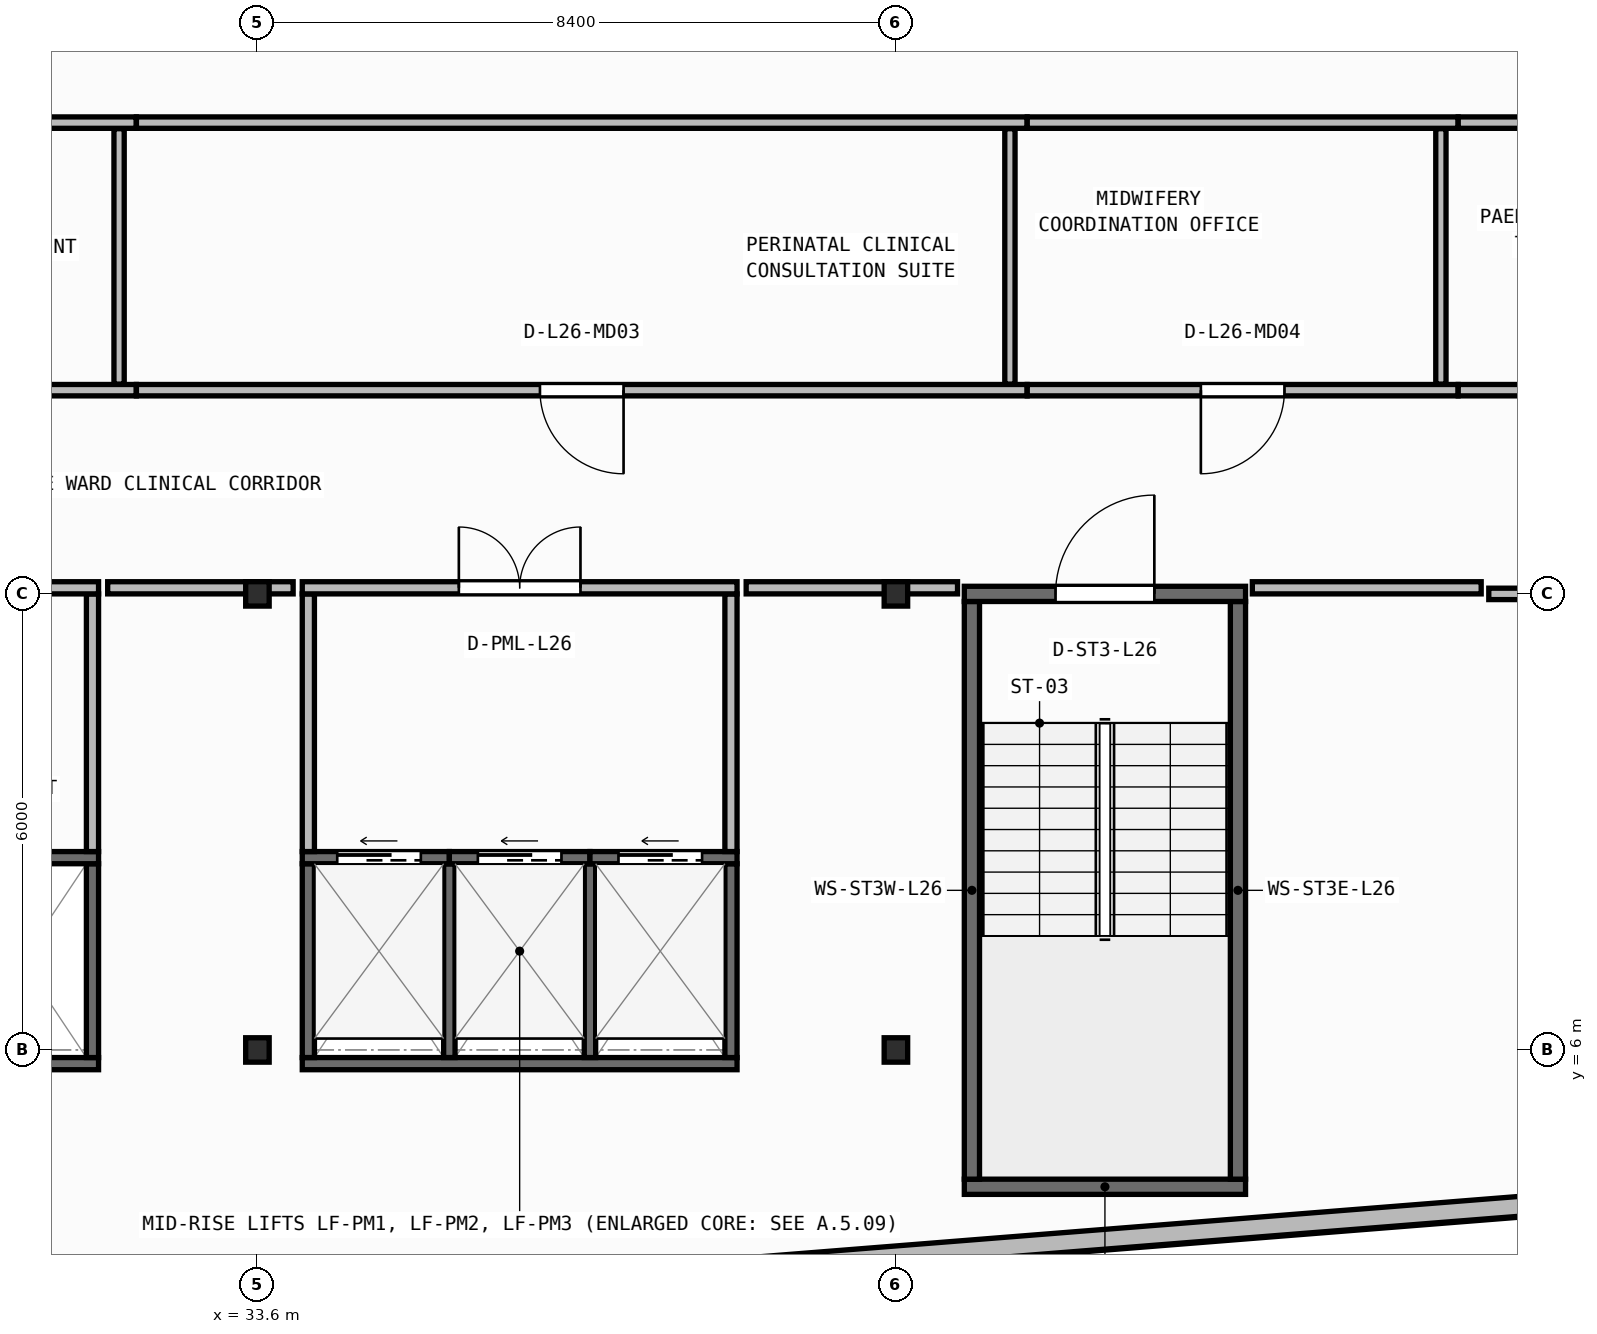
"""IFC4 building model, lengths in metres.
Left out: names, types, materials, properties, quantities, classifications, styles, units other than length and angle.
Written with IfcOpenShell. Run it as: python <this file> out.ifc"""

import sys

from ifc_helpers import new_model, si_unit, direction, frame, frame_2d, origin, origin_2d, place, context, subcontext, project, spatial, rectangle, i_section, extrude, element, fill, save


model = new_model("IFC4")
c1 = context("Model", 3, precision=1e-05, world=origin(), true_north=direction((0.0, 1.0)))
c2 = subcontext(c1, "Body", "Model", "MODEL_VIEW")
j1 = project(units=[si_unit("LENGTHUNIT", "METRE"), si_unit("PLANEANGLEUNIT", "RADIAN")], contexts=[c1])
p1 = place(None, origin())
s1 = spatial("IfcSite", under=j1, at=p1, CompositionType="ELEMENT")
p2 = place(p1, origin())
s2 = spatial("IfcBuilding", under=s1, at=p2, CompositionType="ELEMENT")
p3 = place(p2, frame((0.0, 0.0, 107.3)))
s3 = spatial("IfcBuildingStorey", under=s2, at=p3, CompositionType="ELEMENT", Elevation=107.3)
for number, where, z_axis, x_axis in (
    (1, (33.6, 6.0, 0.0), (0.0, 0.0, 1.0), (1.0, 0.0, 0.0)),
    (2, (42.0, 6.0, 0.0), (0.0, 0.0, 1.0), (1.0, 0.0, 0.0)),
    (3, (33.6, 12.0, 0.0), (0.0, 0.0, 1.0), (1.0, 0.0, 0.0)),
    (4, (42.0, 12.0, 0.0), (0.0, 0.0, 1.0), (1.0, 0.0, 0.0)),
):
    element("IfcColumn", number, at=place(p3, frame(where, z_axis=z_axis, x_axis=x_axis)), inside=s3, PredefinedType="COLUMN", context=c2, shape_type="SweptSolid", body=[
        extrude(i_section(OverallWidth=0.309, OverallDepth=0.321, WebThickness=0.014, FlangeThickness=0.022, FilletRadius=0.017, at=origin_2d()), origin(), (0.0, 0.0, 1.0), 3.95),
    ])
p4 = place(p3, frame((2.76, 0.173, 0.0), z_axis=(0.0, 0.0, 1.0), x_axis=(0.996857931723, 0.079210251617, 0.0)))
e5 = element("IfcWall", 5, at=p4, inside=s3, PredefinedType="STANDARD", context=c2, shape_type="SweptSolid", body=[
    extrude(rectangle(XDim=51.442, YDim=0.26, at=frame_2d((25.721, 0.0))), origin(), (0.0, 0.0, 1.0), 3.71),
])
p5 = place(p4, frame((24.521, 0.0, 0.9)))
e6 = element("IfcOpeningElement", 6, at=p5, cuts=e5, PredefinedType="OPENING", context=c2, shape_type="SweptSolid", body=[
    extrude(rectangle(XDim=2.4, YDim=1.65, at=frame_2d((1.2, 0.825))), frame((0.0, 0.14, 0.0), z_axis=(0.0, -1.0, 0.0), x_axis=(1.0, 0.0, 0.0)), (0.0, 0.0, 1.0), 0.28),
])
p6 = place(p3, frame((42.9, 4.2, 0.0), z_axis=(0.0, 0.0, 1.0), x_axis=(1.0, 0.0, 0.0)))
e7 = element("IfcWall", 7, at=p6, inside=s3, PredefinedType="SHEAR", context=c2, shape_type="SweptSolid", body=[
    extrude(rectangle(XDim=3.7, YDim=0.2, at=frame_2d((1.85, 0.0))), origin(), (0.0, 0.0, 1.0), 3.71),
])
for number, where, z_axis, x_axis in (
    (8, (43.0, 4.3, 0.0), (0.0, 0.0, 1.0), (0.0, 1.0, 0.0)),
    (9, (46.5, 4.3, 0.0), (0.0, 0.0, 1.0), (0.0, 1.0, 0.0)),
):
    element("IfcWall", number, at=place(p3, frame(where, z_axis=z_axis, x_axis=x_axis)), inside=s3, PredefinedType="SHEAR", context=c2, shape_type="SweptSolid", body=[
        extrude(rectangle(XDim=7.6, YDim=0.2, at=frame_2d((3.8, 0.0))), origin(), (0.0, 0.0, 1.0), 3.71),
    ])
p7 = place(p3, frame((42.9, 12.0, 0.0), z_axis=(0.0, 0.0, 1.0), x_axis=(1.0, 0.0, 0.0)))
e10 = element("IfcWall", 10, at=p7, inside=s3, PredefinedType="SHEAR", context=c2, shape_type="SweptSolid", body=[
    extrude(rectangle(XDim=3.7, YDim=0.2, at=frame_2d((1.85, 0.0))), origin(), (0.0, 0.0, 1.0), 3.71),
])
p8 = place(p7, frame((1.2, 0.0, 0.0)))
e11 = element("IfcOpeningElement", 11, at=p8, cuts=e10, PredefinedType="OPENING", context=c2, shape_type="SweptSolid", body=[
    extrude(rectangle(XDim=1.3, YDim=2.15, at=frame_2d((0.65, 1.075))), frame((0.0, 0.11, 0.0), z_axis=(0.0, -1.0, 0.0), x_axis=(1.0, 0.0, 0.0)), (0.0, 0.0, 1.0), 0.22),
])
p9 = place(p3, frame((25.79, 5.82, 0.0), z_axis=(0.0, 0.0, 1.0), x_axis=(1.0, 0.0, 0.0)))
e12 = element("IfcWall", 12, at=p9, inside=s3, PredefinedType="SHEAR", context=c2, shape_type="SweptSolid", body=[
    extrude(rectangle(XDim=5.72, YDim=0.16, at=frame_2d((2.86, 0.0))), origin(), (0.0, 0.0, 1.0), 3.71),
])
p10 = place(p3, frame((31.43, 5.9, 0.0), z_axis=(0.0, 0.0, 1.0), x_axis=(0.0, 1.0, 0.0)))
e13 = element("IfcWall", 13, at=p10, inside=s3, PredefinedType="SHEAR", context=c2, shape_type="SweptSolid", body=[
    extrude(rectangle(XDim=2.55, YDim=0.16, at=frame_2d((1.275, 0.0))), origin(), (0.0, 0.0, 1.0), 3.71),
])
p11 = place(p3, frame((29.575, 8.53, 0.0), z_axis=(0.0, 0.0, 1.0), x_axis=(1.0, 0.0, 0.0)))
e14 = element("IfcWall", 14, at=p11, inside=s3, PredefinedType="SHEAR", context=c2, shape_type="SweptSolid", body=[
    extrude(rectangle(XDim=1.935, YDim=0.16, at=frame_2d((0.968, 0.0))), origin(), (0.0, 0.0, 1.0), 3.71),
])
p12 = place(p3, frame((34.19, 5.82, 0.0), z_axis=(0.0, 0.0, 1.0), x_axis=(1.0, 0.0, 0.0)))
e15 = element("IfcWall", 15, at=p12, inside=s3, PredefinedType="SHEAR", context=c2, shape_type="SweptSolid", body=[
    extrude(rectangle(XDim=5.72, YDim=0.16, at=frame_2d((2.86, 0.0))), origin(), (0.0, 0.0, 1.0), 3.71),
])
for number, where, z_axis, x_axis in (
    (16, (34.27, 5.9, 0.0), (0.0, 0.0, 1.0), (0.0, 1.0, 0.0)),
    (17, (39.83, 5.9, 0.0), (0.0, 0.0, 1.0), (0.0, 1.0, 0.0)),
):
    element("IfcWall", number, at=place(p3, frame(where, z_axis=z_axis, x_axis=x_axis)), inside=s3, PredefinedType="SHEAR", context=c2, shape_type="SweptSolid", body=[
        extrude(rectangle(XDim=2.55, YDim=0.16, at=frame_2d((1.275, 0.0))), origin(), (0.0, 0.0, 1.0), 3.71),
    ])
for number, where, z_axis, x_axis in (
    (18, (36.125, 5.9, 0.0), (0.0, 0.0, 1.0), (0.0, 1.0, 0.0)),
    (19, (37.975, 5.9, 0.0), (0.0, 0.0, 1.0), (0.0, 1.0, 0.0)),
):
    element("IfcWall", number, at=place(p3, frame(where, z_axis=z_axis, x_axis=x_axis)), inside=s3, PredefinedType="SHEAR", context=c2, shape_type="SweptSolid", body=[
        extrude(rectangle(XDim=2.55, YDim=0.15, at=frame_2d((1.275, 0.0))), origin(), (0.0, 0.0, 1.0), 3.71),
    ])
p13 = place(p3, frame((34.19, 8.53, 0.0), z_axis=(0.0, 0.0, 1.0), x_axis=(1.0, 0.0, 0.0)))
e20 = element("IfcWall", 20, at=p13, inside=s3, PredefinedType="SHEAR", context=c2, shape_type="SweptSolid", body=[
    extrude(rectangle(XDim=1.935, YDim=0.16, at=frame_2d((0.968, 0.0))), origin(), (0.0, 0.0, 1.0), 3.71),
])
p14 = place(p13, frame((0.46, 0.0, 0.0)))
e21 = element("IfcOpeningElement", 21, at=p14, cuts=e20, PredefinedType="OPENING", context=c2, shape_type="SweptSolid", body=[
    extrude(rectangle(XDim=1.1, YDim=2.15, at=frame_2d((0.55, 1.075))), frame((0.0, 0.09, 0.0), z_axis=(0.0, -1.0, 0.0), x_axis=(1.0, 0.0, 0.0)), (0.0, 0.0, 1.0), 0.18),
])
p15 = place(p3, frame((36.125, 8.53, 0.0), z_axis=(0.0, 0.0, 1.0), x_axis=(1.0, 0.0, 0.0)))
e22 = element("IfcWall", 22, at=p15, inside=s3, PredefinedType="SHEAR", context=c2, shape_type="SweptSolid", body=[
    extrude(rectangle(XDim=1.85, YDim=0.16, at=frame_2d((0.925, 0.0))), origin(), (0.0, 0.0, 1.0), 3.71),
])
p16 = place(p15, frame((0.375, 0.0, 0.0)))
e23 = element("IfcOpeningElement", 23, at=p16, cuts=e22, PredefinedType="OPENING", context=c2, shape_type="SweptSolid", body=[
    extrude(rectangle(XDim=1.1, YDim=2.15, at=frame_2d((0.55, 1.075))), frame((0.0, 0.09, 0.0), z_axis=(0.0, -1.0, 0.0), x_axis=(1.0, 0.0, 0.0)), (0.0, 0.0, 1.0), 0.18),
])
p17 = place(p3, frame((37.975, 8.53, 0.0), z_axis=(0.0, 0.0, 1.0), x_axis=(1.0, 0.0, 0.0)))
e24 = element("IfcWall", 24, at=p17, inside=s3, PredefinedType="SHEAR", context=c2, shape_type="SweptSolid", body=[
    extrude(rectangle(XDim=1.935, YDim=0.16, at=frame_2d((0.967, 0.0))), origin(), (0.0, 0.0, 1.0), 3.71),
])
p18 = place(p17, frame((0.375, 0.0, 0.0)))
e25 = element("IfcOpeningElement", 25, at=p18, cuts=e24, PredefinedType="OPENING", context=c2, shape_type="SweptSolid", body=[
    extrude(rectangle(XDim=1.1, YDim=2.15, at=frame_2d((0.55, 1.075))), frame((0.0, 0.09, 0.0), z_axis=(0.0, -1.0, 0.0), x_axis=(1.0, 0.0, 0.0)), (0.0, 0.0, 1.0), 0.18),
])
p19 = place(p3, frame((31.43, 8.61, 0.0), z_axis=(0.0, 0.0, 1.0), x_axis=(0.0, 1.0, 0.0)))
e26 = element("IfcWall", 26, at=p19, inside=s3, PredefinedType="PARTITIONING", context=c2, shape_type="SweptSolid", body=[
    extrude(rectangle(XDim=3.39, YDim=0.16, at=frame_2d((1.695, 0.0))), origin(), (0.0, 0.0, 1.0), 3.71),
])
p20 = place(p3, frame((25.79, 12.08, 0.0), z_axis=(0.0, 0.0, 1.0), x_axis=(1.0, 0.0, 0.0)))
e27 = element("IfcWall", 27, at=p20, inside=s3, PredefinedType="PARTITIONING", context=c2, shape_type="SweptSolid", body=[
    extrude(rectangle(XDim=5.72, YDim=0.16, at=frame_2d((2.86, 0.0))), origin(), (0.0, 0.0, 1.0), 3.083),
])
p21 = place(p20, frame((2.16, 0.0, 0.0)))
e28 = element("IfcOpeningElement", 28, at=p21, cuts=e27, PredefinedType="OPENING", context=c2, shape_type="SweptSolid", body=[
    extrude(rectangle(XDim=1.4, YDim=2.15, at=frame_2d((0.7, 1.075))), frame((0.0, 0.09, 0.0), z_axis=(0.0, -1.0, 0.0), x_axis=(1.0, 0.0, 0.0)), (0.0, 0.0, 1.0), 0.18),
])
for number, where, z_axis, x_axis in (
    (29, (34.27, 8.61, 0.0), (0.0, 0.0, 1.0), (0.0, 1.0, 0.0)),
    (30, (39.83, 8.61, 0.0), (0.0, 0.0, 1.0), (0.0, 1.0, 0.0)),
):
    element("IfcWall", number, at=place(p3, frame(where, z_axis=z_axis, x_axis=x_axis)), inside=s3, PredefinedType="PARTITIONING", context=c2, shape_type="SweptSolid", body=[
        extrude(rectangle(XDim=3.39, YDim=0.16, at=frame_2d((1.695, 0.0))), origin(), (0.0, 0.0, 1.0), 3.71),
    ])
p22 = place(p3, frame((34.19, 12.08, 0.0), z_axis=(0.0, 0.0, 1.0), x_axis=(1.0, 0.0, 0.0)))
e31 = element("IfcWall", 31, at=p22, inside=s3, PredefinedType="PARTITIONING", context=c2, shape_type="SweptSolid", body=[
    extrude(rectangle(XDim=5.72, YDim=0.16, at=frame_2d((2.86, 0.0))), origin(), (0.0, 0.0, 1.0), 3.083),
])
p23 = place(p22, frame((2.06, 0.0, 0.0)))
e32 = element("IfcOpeningElement", 32, at=p23, cuts=e31, PredefinedType="OPENING", context=c2, shape_type="SweptSolid", body=[
    extrude(rectangle(XDim=1.6, YDim=2.05, at=frame_2d((0.8, 1.025))), frame((0.0, 0.09, 0.0), z_axis=(0.0, -1.0, 0.0), x_axis=(1.0, 0.0, 0.0)), (0.0, 0.0, 1.0), 0.18),
])
p24 = place(p3, frame((56.64, 12.0, 0.0), z_axis=(0.0, 0.0, 1.0), x_axis=(-1.0, 0.0, 0.0)))
e33 = element("IfcWall", 33, at=p24, inside=s3, PredefinedType="PARTITIONING", context=c2, shape_type="SweptSolid", body=[
    extrude(rectangle(XDim=6.84, YDim=0.15, at=frame_2d((3.42, 0.0))), origin(), (0.0, 0.0, 1.0), 3.083),
])
p25 = place(p24, frame((0.333, 0.0, 0.0)))
e34 = element("IfcOpeningElement", 34, at=p25, cuts=e33, PredefinedType="OPENING", context=c2, shape_type="SweptSolid", body=[
    extrude(rectangle(XDim=1.1, YDim=2.1, at=frame_2d((0.55, 1.05))), frame((0.0, 0.085, 0.0), z_axis=(0.0, -1.0, 0.0), x_axis=(1.0, 0.0, 0.0)), (0.0, 0.0, 1.0), 0.17),
])
p26 = place(p3, frame((32.006, 14.68, 0.0), z_axis=(0.0, 0.0, 1.0), x_axis=(-1.0, 0.0, 0.0)))
e35 = element("IfcWall", 35, at=p26, inside=s3, PredefinedType="PARTITIONING", context=c2, shape_type="SweptSolid", body=[
    extrude(rectangle(XDim=10.452, YDim=0.15, at=frame_2d((5.226, 0.0))), origin(), (0.0, 0.0, 1.0), 3.71),
])
p27 = place(p26, frame((4.676, 0.0, 0.0)))
e36 = element("IfcOpeningElement", 36, at=p27, cuts=e35, PredefinedType="OPENING", context=c2, shape_type="SweptSolid", body=[
    extrude(rectangle(XDim=1.1, YDim=2.1, at=frame_2d((0.55, 1.05))), frame((0.0, 0.085, 0.0), z_axis=(0.0, -1.0, 0.0), x_axis=(1.0, 0.0, 0.0)), (0.0, 0.0, 1.0), 0.17),
])
p28 = place(p3, frame((43.726, 14.68, 0.0), z_axis=(0.0, 0.0, 1.0), x_axis=(-1.0, 0.0, 0.0)))
e37 = element("IfcWall", 37, at=p28, inside=s3, PredefinedType="PARTITIONING", context=c2, shape_type="SweptSolid", body=[
    extrude(rectangle(XDim=11.718, YDim=0.15, at=frame_2d((5.859, 0.0))), origin(), (0.0, 0.0, 1.0), 3.71),
])
p29 = place(p28, frame((5.309, 0.0, 0.0)))
e38 = element("IfcOpeningElement", 38, at=p29, cuts=e37, PredefinedType="OPENING", context=c2, shape_type="SweptSolid", body=[
    extrude(rectangle(XDim=1.1, YDim=2.1, at=frame_2d((0.55, 1.05))), frame((0.0, 0.085, 0.0), z_axis=(0.0, -1.0, 0.0), x_axis=(1.0, 0.0, 0.0)), (0.0, 0.0, 1.0), 0.17),
])
p30 = place(p3, frame((49.396, 14.68, 0.0), z_axis=(0.0, 0.0, 1.0), x_axis=(-1.0, 0.0, 0.0)))
e39 = element("IfcWall", 39, at=p30, inside=s3, PredefinedType="PARTITIONING", context=c2, shape_type="SweptSolid", body=[
    extrude(rectangle(XDim=5.668, YDim=0.15, at=frame_2d((2.834, 0.0))), origin(), (0.0, 0.0, 1.0), 3.71),
])
p31 = place(p30, frame((2.284, 0.0, 0.0)))
e40 = element("IfcOpeningElement", 40, at=p31, cuts=e39, PredefinedType="OPENING", context=c2, shape_type="SweptSolid", body=[
    extrude(rectangle(XDim=1.1, YDim=2.1, at=frame_2d((0.55, 1.05))), frame((0.0, 0.085, 0.0), z_axis=(0.0, -1.0, 0.0), x_axis=(1.0, 0.0, 0.0)), (0.0, 0.0, 1.0), 0.17),
])
p32 = place(p3, frame((56.64, 14.68, 0.0), z_axis=(0.0, 0.0, 1.0), x_axis=(-1.0, 0.0, 0.0)))
e41 = element("IfcWall", 41, at=p32, inside=s3, PredefinedType="PARTITIONING", context=c2, shape_type="SweptSolid", body=[
    extrude(rectangle(XDim=7.242, YDim=0.15, at=frame_2d((3.621, 0.0))), origin(), (0.0, 0.0, 1.0), 3.71),
])
p33 = place(p32, frame((3.071, 0.0, 0.0)))
e42 = element("IfcOpeningElement", 42, at=p33, cuts=e41, PredefinedType="OPENING", context=c2, shape_type="SweptSolid", body=[
    extrude(rectangle(XDim=1.1, YDim=2.1, at=frame_2d((0.55, 1.05))), frame((0.0, 0.085, 0.0), z_axis=(0.0, -1.0, 0.0), x_axis=(1.0, 0.0, 0.0)), (0.0, 0.0, 1.0), 0.17),
])
p34 = place(p3, frame((21.72, 18.2, 0.0), z_axis=(0.0, 0.0, 1.0), x_axis=(1.0, 0.0, 0.0)))
e43 = element("IfcWall", 43, at=p34, inside=s3, PredefinedType="PARTITIONING", context=c2, shape_type="SweptSolid", body=[
    extrude(rectangle(XDim=10.286, YDim=0.15, at=frame_2d((5.143, 0.0))), origin(), (0.0, 0.0, 1.0), 3.71),
])
p35 = place(p3, frame((32.008, 18.2, 0.0), z_axis=(0.0, 0.0, 1.0), x_axis=(1.0, 0.0, 0.0)))
e44 = element("IfcWall", 44, at=p35, inside=s3, PredefinedType="PARTITIONING", context=c2, shape_type="SweptSolid", body=[
    extrude(rectangle(XDim=11.718, YDim=0.15, at=frame_2d((5.859, 0.0))), origin(), (0.0, 0.0, 1.0), 3.71),
])
p36 = place(p3, frame((43.728, 18.2, 0.0), z_axis=(0.0, 0.0, 1.0), x_axis=(1.0, 0.0, 0.0)))
e45 = element("IfcWall", 45, at=p36, inside=s3, PredefinedType="PARTITIONING", context=c2, shape_type="SweptSolid", body=[
    extrude(rectangle(XDim=5.668, YDim=0.15, at=frame_2d((2.834, 0.0))), origin(), (0.0, 0.0, 1.0), 3.71),
])
p37 = place(p3, frame((49.398, 18.2, 0.0), z_axis=(0.0, 0.0, 1.0), x_axis=(1.0, 0.0, 0.0)))
e46 = element("IfcWall", 46, at=p37, inside=s3, PredefinedType="PARTITIONING", context=c2, shape_type="SweptSolid", body=[
    extrude(rectangle(XDim=7.242, YDim=0.15, at=frame_2d((3.621, 0.0))), origin(), (0.0, 0.0, 1.0), 3.71),
])
for number, where, z_axis, x_axis in (
    (47, (31.78, 14.76, 0.0), (0.0, 0.0, 1.0), (0.0, 1.0, 0.0)),
    (48, (43.5, 14.76, 0.0), (0.0, 0.0, 1.0), (0.0, 1.0, 0.0)),
    (49, (49.17, 14.76, 0.0), (0.0, 0.0, 1.0), (0.0, 1.0, 0.0)),
):
    element("IfcWall", number, at=place(p3, frame(where, z_axis=z_axis, x_axis=x_axis)), inside=s3, PredefinedType="PARTITIONING", context=c2, shape_type="SweptSolid", body=[
        extrude(rectangle(XDim=3.36, YDim=0.135, at=frame_2d((1.68, 0.0))), origin(), (0.0, 0.0, 1.0), 3.71),
    ])
p38 = place(p3, frame((31.63, 12.08, 0.0), z_axis=(0.0, 0.0, 1.0), x_axis=(1.0, 0.0, 0.0)))
e50 = element("IfcWall", 50, at=p38, inside=s3, PredefinedType="PARTITIONING", context=c2, shape_type="SweptSolid", body=[
    extrude(rectangle(XDim=2.44, YDim=0.16, at=frame_2d((1.22, 0.0))), origin(), (0.0, 0.0, 1.0), 3.083),
])
p39 = place(p3, frame((40.03, 12.08, 0.0), z_axis=(0.0, 0.0, 1.0), x_axis=(1.0, 0.0, 0.0)))
e51 = element("IfcWall", 51, at=p39, inside=s3, PredefinedType="PARTITIONING", context=c2, shape_type="SweptSolid", body=[
    extrude(rectangle(XDim=2.781, YDim=0.16, at=frame_2d((1.39, 0.0))), origin(), (0.0, 0.0, 1.0), 3.083),
])
p40 = place(p3, frame((46.689, 12.08, 0.0), z_axis=(0.0, 0.0, 1.0), x_axis=(1.0, 0.0, 0.0)))
e52 = element("IfcWall", 52, at=p40, inside=s3, PredefinedType="PARTITIONING", context=c2, shape_type="SweptSolid", body=[
    extrude(rectangle(XDim=3.011, YDim=0.16, at=frame_2d((1.505, 0.0))), origin(), (0.0, 0.0, 1.0), 3.083),
])
p41 = place(p8, origin())
e53 = element("IfcDoor", 53, at=p41, inside=s3, OperationType="SINGLE_SWING_RIGHT", PredefinedType="DOOR", context=c2, shape_type="SweptSolid", body=[
    extrude(rectangle(XDim=1.3, YDim=2.15, at=frame_2d((0.65, 1.075))), frame((0.0, 0.025, 0.0), z_axis=(0.0, -1.0, 0.0), x_axis=(1.0, 0.0, 0.0)), (0.0, 0.0, 1.0), 0.05),
])
fill(e11, e53)
p42 = place(p14, origin())
e54 = element("IfcDoor", 54, at=p42, inside=s3, OperationType="SLIDING_TO_LEFT", PredefinedType="DOOR", context=c2, shape_type="SweptSolid", body=[
    extrude(rectangle(XDim=1.1, YDim=2.15, at=frame_2d((0.55, 1.075))), frame((0.0, 0.025, 0.0), z_axis=(0.0, -1.0, 0.0), x_axis=(1.0, 0.0, 0.0)), (0.0, 0.0, 1.0), 0.05),
])
fill(e21, e54)
p43 = place(p16, origin())
e55 = element("IfcDoor", 55, at=p43, inside=s3, OperationType="SLIDING_TO_LEFT", PredefinedType="DOOR", context=c2, shape_type="SweptSolid", body=[
    extrude(rectangle(XDim=1.1, YDim=2.15, at=frame_2d((0.55, 1.075))), frame((0.0, 0.025, 0.0), z_axis=(0.0, -1.0, 0.0), x_axis=(1.0, 0.0, 0.0)), (0.0, 0.0, 1.0), 0.05),
])
fill(e23, e55)
p44 = place(p18, origin())
e56 = element("IfcDoor", 56, at=p44, inside=s3, OperationType="SLIDING_TO_LEFT", PredefinedType="DOOR", context=c2, shape_type="SweptSolid", body=[
    extrude(rectangle(XDim=1.1, YDim=2.15, at=frame_2d((0.55, 1.075))), frame((0.0, 0.025, 0.0), z_axis=(0.0, -1.0, 0.0), x_axis=(1.0, 0.0, 0.0)), (0.0, 0.0, 1.0), 0.05),
])
fill(e25, e56)
p45 = place(p23, origin())
e57 = element("IfcDoor", 57, at=p45, inside=s3, OperationType="DOUBLE_DOOR_SINGLE_SWING", PredefinedType="DOOR", context=c2, shape_type="SweptSolid", body=[
    extrude(rectangle(XDim=1.6, YDim=2.05, at=frame_2d((0.8, 1.025))), frame((0.0, 0.025, 0.0), z_axis=(0.0, -1.0, 0.0), x_axis=(1.0, 0.0, 0.0)), (0.0, 0.0, 1.0), 0.05),
])
fill(e32, e57)
p46 = place(p29, origin())
e58 = element("IfcDoor", 58, at=p46, inside=s3, OperationType="SINGLE_SWING_LEFT", PredefinedType="DOOR", context=c2, shape_type="SweptSolid", body=[
    extrude(rectangle(XDim=1.1, YDim=2.1, at=frame_2d((0.55, 1.05))), frame((0.0, 0.025, 0.0), z_axis=(0.0, -1.0, 0.0), x_axis=(1.0, 0.0, 0.0)), (0.0, 0.0, 1.0), 0.05),
])
fill(e38, e58)
p47 = place(p31, origin())
e59 = element("IfcDoor", 59, at=p47, inside=s3, OperationType="SINGLE_SWING_RIGHT", PredefinedType="DOOR", context=c2, shape_type="SweptSolid", body=[
    extrude(rectangle(XDim=1.1, YDim=2.1, at=frame_2d((0.55, 1.05))), frame((0.0, 0.025, 0.0), z_axis=(0.0, -1.0, 0.0), x_axis=(1.0, 0.0, 0.0)), (0.0, 0.0, 1.0), 0.05),
])
fill(e40, e59)
save(model, sys.argv[1])
